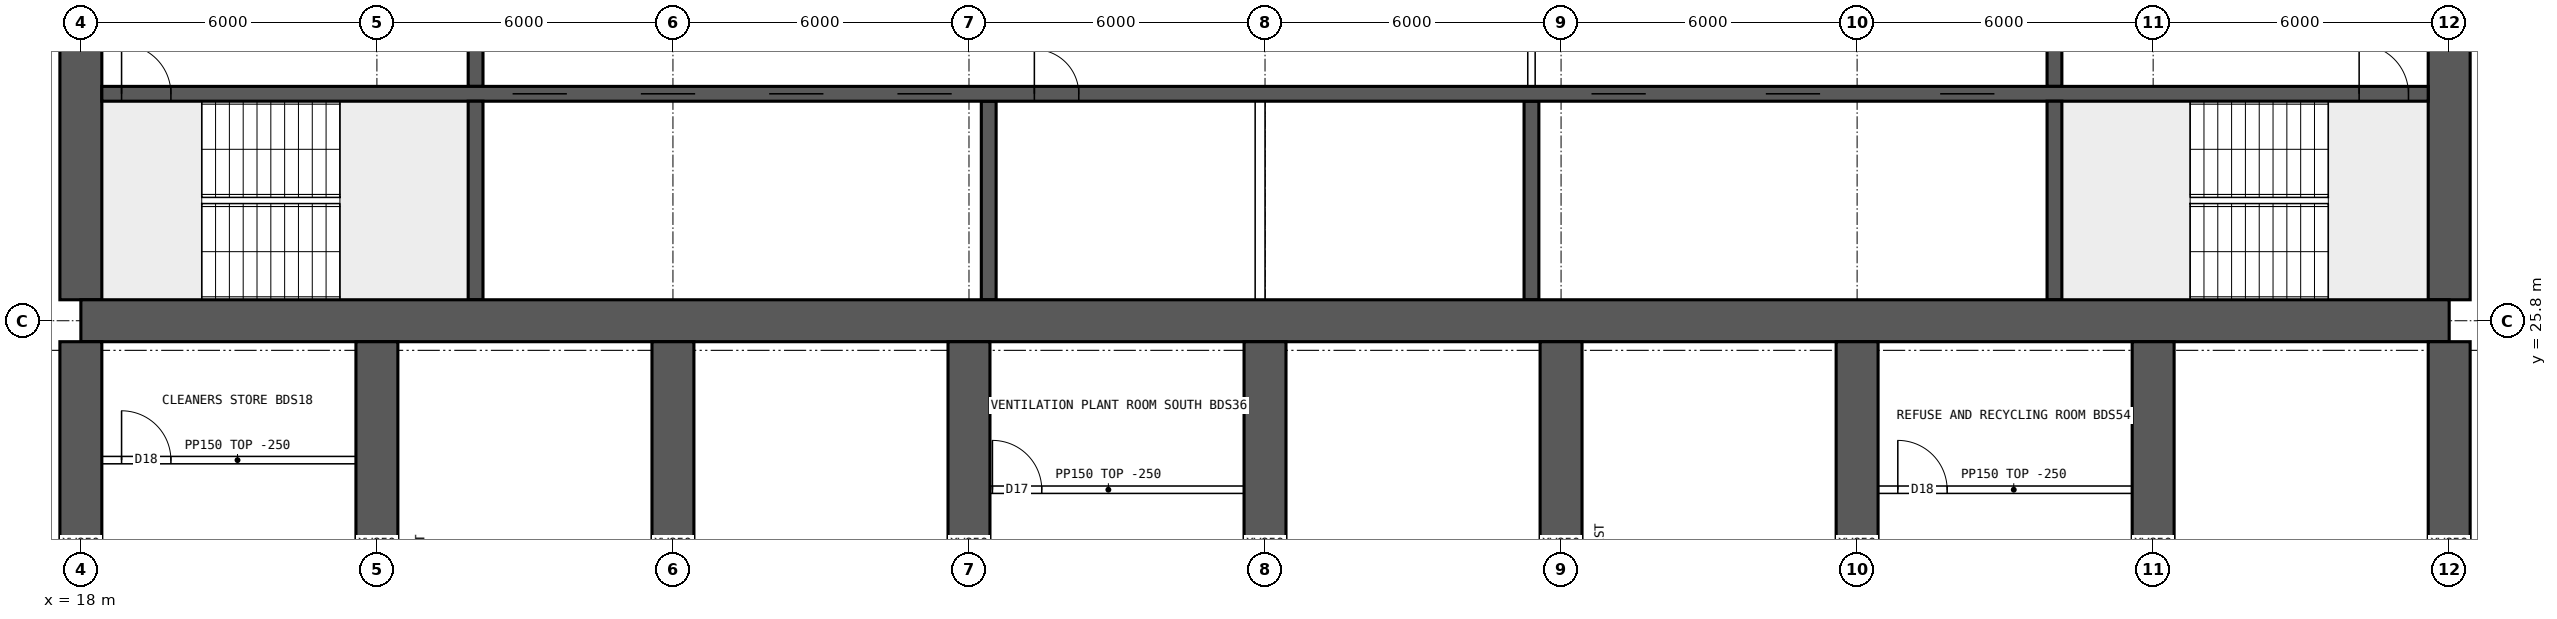
"""IFC4 building model, lengths in metres.
Left out: names, types, materials, properties, quantities, classifications, styles, units other than length and angle.
Written with IfcOpenShell. Run it as: python <this file> out.ifc"""

import sys

from ifc_helpers import new_model, si_unit, direction, frame, frame_2d, origin, place, context, subcontext, project, spatial, rectangle, extrude, element, fill, save


model = new_model("IFC4")
c1 = context("Model", 3, precision=1e-05, world=origin(), true_north=direction((0.0, 1.0)))
c2 = subcontext(c1, "Body", "Model", "MODEL_VIEW")
j1 = project(units=[si_unit("LENGTHUNIT", "METRE"), si_unit("PLANEANGLEUNIT", "RADIAN")], contexts=[c1])
p1 = place(None, origin())
s1 = spatial("IfcSite", under=j1, at=p1, CompositionType="ELEMENT")
p2 = place(p1, origin())
s2 = spatial("IfcBuilding", under=s1, at=p2, CompositionType="ELEMENT")
p3 = place(p2, frame((0.0, 0.0, 171.1)))
s3 = spatial("IfcBuildingStorey", under=s2, at=p3, CompositionType="ELEMENT", Elevation=171.1)
p4 = place(p3, frame((18.0, 25.8, 0.0), z_axis=(0.0, 0.0, 1.0), x_axis=(1.0, 0.0, 0.0)))
e1 = element("IfcWall", 1, at=p4, inside=s3, PredefinedType="SHEAR", context=c2, shape_type="SweptSolid", body=[
    extrude(rectangle(XDim=48.0, YDim=0.85, at=frame_2d((24.0, 0.0))), origin(), (0.0, 0.0, 1.0), 3.75),
])
p5 = place(p3, frame((18.0, 26.225, 0.0), z_axis=(0.0, 0.0, 1.0), x_axis=(0.0, 1.0, 0.0)))
e2 = element("IfcWall", 2, at=p5, inside=s3, PredefinedType="SHEAR", context=c2, shape_type="SweptSolid", body=[
    extrude(rectangle(XDim=11.55, YDim=0.85, at=frame_2d((5.775, 0.0))), origin(), (0.0, 0.0, 1.0), 3.75),
])
p6 = place(p5, frame((5.075, 0.0, 0.0)))
e3 = element("IfcOpeningElement", 3, at=p6, cuts=e2, PredefinedType="OPENING", context=c2, shape_type="SweptSolid", body=[
    extrude(rectangle(XDim=1.2, YDim=2.1, at=frame_2d((0.6, 1.05))), frame((0.0, 0.435, 0.0), z_axis=(0.0, -1.0, 0.0), x_axis=(1.0, 0.0, 0.0)), (0.0, 0.0, 1.0), 0.87),
])
p7 = place(p3, frame((66.0, 26.225, 0.0), z_axis=(0.0, 0.0, 1.0), x_axis=(0.0, 1.0, 0.0)))
e4 = element("IfcWall", 4, at=p7, inside=s3, PredefinedType="SHEAR", context=c2, shape_type="SweptSolid", body=[
    extrude(rectangle(XDim=11.55, YDim=0.85, at=frame_2d((5.775, 0.0))), origin(), (0.0, 0.0, 1.0), 3.75),
])
p8 = place(p7, frame((5.075, 0.0, 0.0)))
e5 = element("IfcOpeningElement", 5, at=p8, cuts=e4, PredefinedType="OPENING", context=c2, shape_type="SweptSolid", body=[
    extrude(rectangle(XDim=1.2, YDim=2.1, at=frame_2d((0.6, 1.05))), frame((0.0, 0.435, 0.0), z_axis=(0.0, -1.0, 0.0), x_axis=(1.0, 0.0, 0.0)), (0.0, 0.0, 1.0), 0.87),
])
p9 = place(p3, frame((18.425, 30.4, 0.0), z_axis=(0.0, 0.0, 1.0), x_axis=(1.0, 0.0, 0.0)))
e6 = element("IfcWall", 6, at=p9, inside=s3, PredefinedType="SHEAR", context=c2, shape_type="SweptSolid", body=[
    extrude(rectangle(XDim=47.15, YDim=0.3, at=frame_2d((23.575, 0.0))), origin(), (0.0, 0.0, 1.0), 3.75),
])
p10 = place(p9, frame((0.4, 0.0, 0.0)))
e7 = element("IfcOpeningElement", 7, at=p10, cuts=e6, PredefinedType="OPENING", context=c2, shape_type="SweptSolid", body=[
    extrude(rectangle(XDim=1.0, YDim=2.1, at=frame_2d((0.5, 1.05))), frame((0.0, 0.16, 0.0), z_axis=(0.0, -1.0, 0.0), x_axis=(1.0, 0.0, 0.0)), (0.0, 0.0, 1.0), 0.32),
])
p11 = place(p9, frame((45.75, 0.0, 0.0)))
e8 = element("IfcOpeningElement", 8, at=p11, cuts=e6, PredefinedType="OPENING", context=c2, shape_type="SweptSolid", body=[
    extrude(rectangle(XDim=1.0, YDim=2.1, at=frame_2d((0.5, 1.05))), frame((0.0, 0.16, 0.0), z_axis=(0.0, -1.0, 0.0), x_axis=(1.0, 0.0, 0.0)), (0.0, 0.0, 1.0), 0.32),
])
p12 = place(p9, frame((8.325, 0.0, 0.0)))
e9 = element("IfcOpeningElement", 9, at=p12, cuts=e6, PredefinedType="OPENING", context=c2, shape_type="SweptSolid", body=[
    extrude(rectangle(XDim=1.1, YDim=2.1, at=frame_2d((0.55, 1.05))), frame((0.0, 0.16, 0.0), z_axis=(0.0, -1.0, 0.0), x_axis=(1.0, 0.0, 0.0)), (0.0, 0.0, 1.0), 0.32),
])
p13 = place(p9, frame((10.925, 0.0, 0.0)))
e10 = element("IfcOpeningElement", 10, at=p13, cuts=e6, PredefinedType="OPENING", context=c2, shape_type="SweptSolid", body=[
    extrude(rectangle(XDim=1.1, YDim=2.1, at=frame_2d((0.55, 1.05))), frame((0.0, 0.16, 0.0), z_axis=(0.0, -1.0, 0.0), x_axis=(1.0, 0.0, 0.0)), (0.0, 0.0, 1.0), 0.32),
])
p14 = place(p9, frame((13.525, 0.0, 0.0)))
e11 = element("IfcOpeningElement", 11, at=p14, cuts=e6, PredefinedType="OPENING", context=c2, shape_type="SweptSolid", body=[
    extrude(rectangle(XDim=1.1, YDim=2.1, at=frame_2d((0.55, 1.05))), frame((0.0, 0.16, 0.0), z_axis=(0.0, -1.0, 0.0), x_axis=(1.0, 0.0, 0.0)), (0.0, 0.0, 1.0), 0.32),
])
p15 = place(p9, frame((16.125, 0.0, 0.0)))
e12 = element("IfcOpeningElement", 12, at=p15, cuts=e6, PredefinedType="OPENING", context=c2, shape_type="SweptSolid", body=[
    extrude(rectangle(XDim=1.1, YDim=2.1, at=frame_2d((0.55, 1.05))), frame((0.0, 0.16, 0.0), z_axis=(0.0, -1.0, 0.0), x_axis=(1.0, 0.0, 0.0)), (0.0, 0.0, 1.0), 0.32),
])
p16 = place(p9, frame((18.9, 0.0, 0.0)))
e13 = element("IfcOpeningElement", 13, at=p16, cuts=e6, PredefinedType="OPENING", context=c2, shape_type="SweptSolid", body=[
    extrude(rectangle(XDim=0.9, YDim=2.1, at=frame_2d((0.45, 1.05))), frame((0.0, 0.16, 0.0), z_axis=(0.0, -1.0, 0.0), x_axis=(1.0, 0.0, 0.0)), (0.0, 0.0, 1.0), 0.32),
])
p17 = place(p9, frame((30.192, 0.0, 0.0)))
e14 = element("IfcOpeningElement", 14, at=p17, cuts=e6, PredefinedType="OPENING", context=c2, shape_type="SweptSolid", body=[
    extrude(rectangle(XDim=1.1, YDim=2.1, at=frame_2d((0.55, 1.05))), frame((0.0, 0.16, 0.0), z_axis=(0.0, -1.0, 0.0), x_axis=(1.0, 0.0, 0.0)), (0.0, 0.0, 1.0), 0.32),
])
p18 = place(p9, frame((33.725, 0.0, 0.0)))
e15 = element("IfcOpeningElement", 15, at=p18, cuts=e6, PredefinedType="OPENING", context=c2, shape_type="SweptSolid", body=[
    extrude(rectangle(XDim=1.1, YDim=2.1, at=frame_2d((0.55, 1.05))), frame((0.0, 0.16, 0.0), z_axis=(0.0, -1.0, 0.0), x_axis=(1.0, 0.0, 0.0)), (0.0, 0.0, 1.0), 0.32),
])
p19 = place(p9, frame((37.258, 0.0, 0.0)))
e16 = element("IfcOpeningElement", 16, at=p19, cuts=e6, PredefinedType="OPENING", context=c2, shape_type="SweptSolid", body=[
    extrude(rectangle(XDim=1.1, YDim=2.1, at=frame_2d((0.55, 1.05))), frame((0.0, 0.16, 0.0), z_axis=(0.0, -1.0, 0.0), x_axis=(1.0, 0.0, 0.0)), (0.0, 0.0, 1.0), 0.32),
])
for number, where, z_axis, x_axis in (
    (17, (26.0, 26.225, 0.0), (0.0, 0.0, 1.0), (0.0, 1.0, 0.0)),
    (18, (58.0, 26.225, 0.0), (0.0, 0.0, 1.0), (0.0, 1.0, 0.0)),
):
    element("IfcWall", number, at=place(p3, frame(where, z_axis=z_axis, x_axis=x_axis)), inside=s3, PredefinedType="SHEAR", context=c2, shape_type="SweptSolid", body=[
        extrude(rectangle(XDim=4.025, YDim=0.3, at=frame_2d((2.012, 0.0))), origin(), (0.0, 0.0, 1.0), 3.75),
    ])
p20 = place(p3, frame((26.0, 30.55, 0.0), z_axis=(0.0, 0.0, 1.0), x_axis=(0.0, 1.0, 0.0)))
e19 = element("IfcWall", 19, at=p20, inside=s3, PredefinedType="SHEAR", context=c2, shape_type="SweptSolid", body=[
    extrude(rectangle(XDim=3.9, YDim=0.3, at=frame_2d((1.95, 0.0))), origin(), (0.0, 0.0, 1.0), 3.75),
])
p21 = place(p20, frame((1.4, 0.0, 0.0)))
e20 = element("IfcOpeningElement", 20, at=p21, cuts=e19, PredefinedType="OPENING", context=c2, shape_type="SweptSolid", body=[
    extrude(rectangle(XDim=1.2, YDim=2.1, at=frame_2d((0.6, 1.05))), frame((0.0, 0.16, 0.0), z_axis=(0.0, -1.0, 0.0), x_axis=(1.0, 0.0, 0.0)), (0.0, 0.0, 1.0), 0.32),
])
p22 = place(p3, frame((58.0, 30.55, 0.0), z_axis=(0.0, 0.0, 1.0), x_axis=(0.0, 1.0, 0.0)))
e21 = element("IfcWall", 21, at=p22, inside=s3, PredefinedType="SHEAR", context=c2, shape_type="SweptSolid", body=[
    extrude(rectangle(XDim=3.9, YDim=0.3, at=frame_2d((1.95, 0.0))), origin(), (0.0, 0.0, 1.0), 3.75),
])
p23 = place(p22, frame((1.4, 0.0, 0.0)))
e22 = element("IfcOpeningElement", 22, at=p23, cuts=e21, PredefinedType="OPENING", context=c2, shape_type="SweptSolid", body=[
    extrude(rectangle(XDim=1.2, YDim=2.1, at=frame_2d((0.6, 1.05))), frame((0.0, 0.16, 0.0), z_axis=(0.0, -1.0, 0.0), x_axis=(1.0, 0.0, 0.0)), (0.0, 0.0, 1.0), 0.32),
])
for number, where, z_axis, x_axis in (
    (23, (36.4, 26.225, 0.0), (0.0, 0.0, 1.0), (0.0, 1.0, 0.0)),
    (24, (47.4, 26.225, 0.0), (0.0, 0.0, 1.0), (0.0, 1.0, 0.0)),
):
    element("IfcWall", number, at=place(p3, frame(where, z_axis=z_axis, x_axis=x_axis)), inside=s3, PredefinedType="SHEAR", context=c2, shape_type="SweptSolid", body=[
        extrude(rectangle(XDim=4.025, YDim=0.3, at=frame_2d((2.012, 0.0))), origin(), (0.0, 0.0, 1.0), 3.75),
    ])
for number, where, z_axis, x_axis in (
    (25, (18.0, 17.2, 0.0), (0.0, 0.0, 1.0), (0.0, 1.0, 0.0)),
    (26, (24.0, 17.2, 0.0), (0.0, 0.0, 1.0), (0.0, 1.0, 0.0)),
    (27, (30.0, 17.2, 0.0), (0.0, 0.0, 1.0), (0.0, 1.0, 0.0)),
    (28, (36.0, 17.2, 0.0), (0.0, 0.0, 1.0), (0.0, 1.0, 0.0)),
    (29, (42.0, 17.2, 0.0), (0.0, 0.0, 1.0), (0.0, 1.0, 0.0)),
    (30, (48.0, 17.2, 0.0), (0.0, 0.0, 1.0), (0.0, 1.0, 0.0)),
    (31, (54.0, 17.2, 0.0), (0.0, 0.0, 1.0), (0.0, 1.0, 0.0)),
    (32, (60.0, 17.2, 0.0), (0.0, 0.0, 1.0), (0.0, 1.0, 0.0)),
    (33, (66.0, 17.2, 0.0), (0.0, 0.0, 1.0), (0.0, 1.0, 0.0)),
):
    element("IfcWall", number, at=place(p3, frame(where, z_axis=z_axis, x_axis=x_axis)), inside=s3, PredefinedType="SHEAR", context=c2, shape_type="SweptSolid", body=[
        extrude(rectangle(XDim=8.175, YDim=0.85, at=frame_2d((4.087, 0.0))), origin(), (0.0, 0.0, 1.0), 3.75),
    ])
p24 = place(p3, frame((47.4, 30.55, 0.0), z_axis=(0.0, 0.0, 1.0), x_axis=(0.0, 1.0, 0.0)))
e34 = element("IfcWall", 34, at=p24, inside=s3, PredefinedType="SOLIDWALL", context=c2, shape_type="SweptSolid", body=[
    extrude(rectangle(XDim=3.9, YDim=0.15, at=frame_2d((1.95, 0.0))), origin(), (0.0, 0.0, 1.0), 3.5),
])
p25 = place(p24, frame((1.15, 0.0, 0.0)))
e35 = element("IfcOpeningElement", 35, at=p25, cuts=e34, PredefinedType="OPENING", context=c2, shape_type="SweptSolid", body=[
    extrude(rectangle(XDim=1.6, YDim=2.1, at=frame_2d((0.8, 1.05))), frame((0.0, 0.085, 0.0), z_axis=(0.0, -1.0, 0.0), x_axis=(1.0, 0.0, 0.0)), (0.0, 0.0, 1.0), 0.17),
])
p26 = place(p3, frame((41.9, 26.225, 0.0), z_axis=(0.0, 0.0, 1.0), x_axis=(0.0, 1.0, 0.0)))
e36 = element("IfcWall", 36, at=p26, inside=s3, PredefinedType="SOLIDWALL", context=c2, shape_type="SweptSolid", body=[
    extrude(rectangle(XDim=4.025, YDim=0.2, at=frame_2d((2.012, 0.0))), origin(), (0.0, 0.0, 1.0), 3.5),
])
p27 = place(p3, frame((18.425, 22.975, 0.0), z_axis=(0.0, 0.0, 1.0), x_axis=(1.0, 0.0, 0.0)))
e37 = element("IfcWall", 37, at=p27, inside=s3, PredefinedType="PARTITIONING", context=c2, shape_type="SweptSolid", body=[
    extrude(rectangle(XDim=5.5, YDim=0.15, at=frame_2d((2.75, 0.0))), origin(), (0.0, 0.0, 1.0), 3.5),
])
p28 = place(p27, frame((0.4, 0.0, 0.0)))
e38 = element("IfcOpeningElement", 38, at=p28, cuts=e37, PredefinedType="OPENING", context=c2, shape_type="SweptSolid", body=[
    extrude(rectangle(XDim=1.0, YDim=2.1, at=frame_2d((0.5, 1.05))), frame((0.0, 0.085, 0.0), z_axis=(0.0, -1.0, 0.0), x_axis=(1.0, 0.0, 0.0)), (0.0, 0.0, 1.0), 0.17),
])
p29 = place(p3, frame((36.075, 22.375, 0.0), z_axis=(0.0, 0.0, 1.0), x_axis=(1.0, 0.0, 0.0)))
e39 = element("IfcWall", 39, at=p29, inside=s3, PredefinedType="PARTITIONING", context=c2, shape_type="SweptSolid", body=[
    extrude(rectangle(XDim=5.5, YDim=0.15, at=frame_2d((2.75, 0.0))), origin(), (0.0, 0.0, 1.0), 3.5),
])
p30 = place(p29, frame((0.4, 0.0, 0.0)))
e40 = element("IfcOpeningElement", 40, at=p30, cuts=e39, PredefinedType="OPENING", context=c2, shape_type="SweptSolid", body=[
    extrude(rectangle(XDim=1.0, YDim=2.1, at=frame_2d((0.5, 1.05))), frame((0.0, 0.085, 0.0), z_axis=(0.0, -1.0, 0.0), x_axis=(1.0, 0.0, 0.0)), (0.0, 0.0, 1.0), 0.17),
])
p31 = place(p3, frame((54.425, 22.375, 0.0), z_axis=(0.0, 0.0, 1.0), x_axis=(1.0, 0.0, 0.0)))
e41 = element("IfcWall", 41, at=p31, inside=s3, PredefinedType="PARTITIONING", context=c2, shape_type="SweptSolid", body=[
    extrude(rectangle(XDim=5.5, YDim=0.15, at=frame_2d((2.75, 0.0))), origin(), (0.0, 0.0, 1.0), 3.5),
])
p32 = place(p31, frame((0.4, 0.0, 0.0)))
e42 = element("IfcOpeningElement", 42, at=p32, cuts=e41, PredefinedType="OPENING", context=c2, shape_type="SweptSolid", body=[
    extrude(rectangle(XDim=1.0, YDim=2.1, at=frame_2d((0.5, 1.05))), frame((0.0, 0.085, 0.0), z_axis=(0.0, -1.0, 0.0), x_axis=(1.0, 0.0, 0.0)), (0.0, 0.0, 1.0), 0.17),
])
p33 = place(p10, origin())
e43 = element("IfcDoor", 43, at=p33, inside=s3, OperationType="SINGLE_SWING_LEFT", PredefinedType="DOOR", context=c2, shape_type="SweptSolid", body=[
    extrude(rectangle(XDim=1.0, YDim=2.1, at=frame_2d((0.5, 1.05))), frame((0.0, 0.025, 0.0), z_axis=(0.0, -1.0, 0.0), x_axis=(1.0, 0.0, 0.0)), (0.0, 0.0, 1.0), 0.05),
])
fill(e7, e43)
p34 = place(p11, origin())
e44 = element("IfcDoor", 44, at=p34, inside=s3, OperationType="SINGLE_SWING_LEFT", PredefinedType="DOOR", context=c2, shape_type="SweptSolid", body=[
    extrude(rectangle(XDim=1.0, YDim=2.1, at=frame_2d((0.5, 1.05))), frame((0.0, 0.025, 0.0), z_axis=(0.0, -1.0, 0.0), x_axis=(1.0, 0.0, 0.0)), (0.0, 0.0, 1.0), 0.05),
])
fill(e8, e44)
p35 = place(p12, origin())
e45 = element("IfcDoor", 45, at=p35, inside=s3, OperationType="DOUBLE_DOOR_SLIDING", PredefinedType="DOOR", context=c2, shape_type="SweptSolid", body=[
    extrude(rectangle(XDim=1.1, YDim=2.1, at=frame_2d((0.55, 1.05))), frame((0.0, 0.025, 0.0), z_axis=(0.0, -1.0, 0.0), x_axis=(1.0, 0.0, 0.0)), (0.0, 0.0, 1.0), 0.05),
])
fill(e9, e45)
p36 = place(p13, origin())
e46 = element("IfcDoor", 46, at=p36, inside=s3, OperationType="DOUBLE_DOOR_SLIDING", PredefinedType="DOOR", context=c2, shape_type="SweptSolid", body=[
    extrude(rectangle(XDim=1.1, YDim=2.1, at=frame_2d((0.55, 1.05))), frame((0.0, 0.025, 0.0), z_axis=(0.0, -1.0, 0.0), x_axis=(1.0, 0.0, 0.0)), (0.0, 0.0, 1.0), 0.05),
])
fill(e10, e46)
p37 = place(p14, origin())
e47 = element("IfcDoor", 47, at=p37, inside=s3, OperationType="DOUBLE_DOOR_SLIDING", PredefinedType="DOOR", context=c2, shape_type="SweptSolid", body=[
    extrude(rectangle(XDim=1.1, YDim=2.1, at=frame_2d((0.55, 1.05))), frame((0.0, 0.025, 0.0), z_axis=(0.0, -1.0, 0.0), x_axis=(1.0, 0.0, 0.0)), (0.0, 0.0, 1.0), 0.05),
])
fill(e11, e47)
p38 = place(p15, origin())
e48 = element("IfcDoor", 48, at=p38, inside=s3, OperationType="DOUBLE_DOOR_SLIDING", PredefinedType="DOOR", context=c2, shape_type="SweptSolid", body=[
    extrude(rectangle(XDim=1.1, YDim=2.1, at=frame_2d((0.55, 1.05))), frame((0.0, 0.025, 0.0), z_axis=(0.0, -1.0, 0.0), x_axis=(1.0, 0.0, 0.0)), (0.0, 0.0, 1.0), 0.05),
])
fill(e12, e48)
p39 = place(p16, origin())
e49 = element("IfcDoor", 49, at=p39, inside=s3, OperationType="SINGLE_SWING_LEFT", PredefinedType="DOOR", context=c2, shape_type="SweptSolid", body=[
    extrude(rectangle(XDim=0.9, YDim=2.1, at=frame_2d((0.45, 1.05))), frame((0.0, 0.025, 0.0), z_axis=(0.0, -1.0, 0.0), x_axis=(1.0, 0.0, 0.0)), (0.0, 0.0, 1.0), 0.05),
])
fill(e13, e49)
p40 = place(p17, origin())
e50 = element("IfcDoor", 50, at=p40, inside=s3, OperationType="DOUBLE_DOOR_SLIDING", PredefinedType="DOOR", context=c2, shape_type="SweptSolid", body=[
    extrude(rectangle(XDim=1.1, YDim=2.1, at=frame_2d((0.55, 1.05))), frame((0.0, 0.025, 0.0), z_axis=(0.0, -1.0, 0.0), x_axis=(1.0, 0.0, 0.0)), (0.0, 0.0, 1.0), 0.05),
])
fill(e14, e50)
p41 = place(p18, origin())
e51 = element("IfcDoor", 51, at=p41, inside=s3, OperationType="DOUBLE_DOOR_SLIDING", PredefinedType="DOOR", context=c2, shape_type="SweptSolid", body=[
    extrude(rectangle(XDim=1.1, YDim=2.1, at=frame_2d((0.55, 1.05))), frame((0.0, 0.025, 0.0), z_axis=(0.0, -1.0, 0.0), x_axis=(1.0, 0.0, 0.0)), (0.0, 0.0, 1.0), 0.05),
])
fill(e15, e51)
p42 = place(p19, origin())
e52 = element("IfcDoor", 52, at=p42, inside=s3, OperationType="DOUBLE_DOOR_SLIDING", PredefinedType="DOOR", context=c2, shape_type="SweptSolid", body=[
    extrude(rectangle(XDim=1.1, YDim=2.1, at=frame_2d((0.55, 1.05))), frame((0.0, 0.025, 0.0), z_axis=(0.0, -1.0, 0.0), x_axis=(1.0, 0.0, 0.0)), (0.0, 0.0, 1.0), 0.05),
])
fill(e16, e52)
p43 = place(p28, origin())
e53 = element("IfcDoor", 53, at=p43, inside=s3, OperationType="SINGLE_SWING_LEFT", PredefinedType="DOOR", context=c2, shape_type="SweptSolid", body=[
    extrude(rectangle(XDim=1.0, YDim=2.1, at=frame_2d((0.5, 1.05))), frame((0.0, 0.025, 0.0), z_axis=(0.0, -1.0, 0.0), x_axis=(1.0, 0.0, 0.0)), (0.0, 0.0, 1.0), 0.05),
])
fill(e38, e53)
p44 = place(p30, origin())
e54 = element("IfcDoor", 54, at=p44, inside=s3, OperationType="SINGLE_SWING_LEFT", PredefinedType="DOOR", context=c2, shape_type="SweptSolid", body=[
    extrude(rectangle(XDim=1.0, YDim=2.1, at=frame_2d((0.5, 1.05))), frame((0.0, 0.025, 0.0), z_axis=(0.0, -1.0, 0.0), x_axis=(1.0, 0.0, 0.0)), (0.0, 0.0, 1.0), 0.05),
])
fill(e40, e54)
p45 = place(p32, origin())
e55 = element("IfcDoor", 55, at=p45, inside=s3, OperationType="SINGLE_SWING_LEFT", PredefinedType="DOOR", context=c2, shape_type="SweptSolid", body=[
    extrude(rectangle(XDim=1.0, YDim=2.1, at=frame_2d((0.5, 1.05))), frame((0.0, 0.025, 0.0), z_axis=(0.0, -1.0, 0.0), x_axis=(1.0, 0.0, 0.0)), (0.0, 0.0, 1.0), 0.05),
])
fill(e42, e55)
save(model, sys.argv[1])
